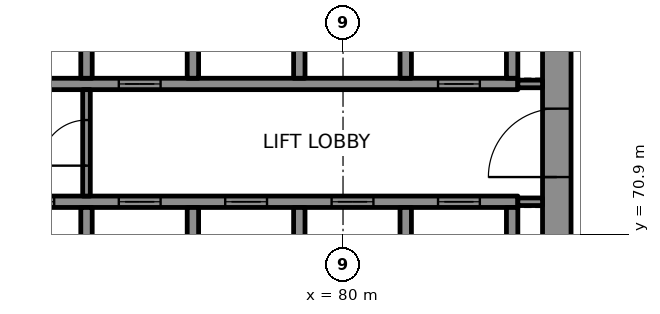
"""IFC4 building model, lengths in metres.
Left out: names, types, materials, properties, quantities, classifications, styles, units other than length and angle.
Written with IfcOpenShell. Run it as: python <this file> out.ifc"""

import sys

from ifc_helpers import new_model, si_unit, direction, frame, frame_2d, origin, place, context, subcontext, project, spatial, rectangle, extrude, element, fill, save


model = new_model("IFC4")
c1 = context("Model", 3, precision=1e-05, world=origin(), true_north=direction((0.0, 1.0)))
c2 = subcontext(c1, "Body", "Model", "MODEL_VIEW")
j1 = project(units=[si_unit("LENGTHUNIT", "METRE"), si_unit("PLANEANGLEUNIT", "RADIAN")], contexts=[c1])
p1 = place(None, origin())
s1 = spatial("IfcSite", under=j1, at=p1, CompositionType="ELEMENT")
p2 = place(p1, origin())
s2 = spatial("IfcBuilding", under=s1, at=p2, CompositionType="ELEMENT")
p3 = place(p2, frame((0.0, 0.0, 151.3)))
s3 = spatial("IfcBuildingStorey", under=s2, at=p3, CompositionType="ELEMENT", Elevation=151.3)
p4 = place(p3, frame((85.625, 67.75, 0.0), z_axis=(0.0, 0.0, 1.0), x_axis=(0.0, 1.0, 0.0)))
e1 = element("IfcWall", 1, at=p4, inside=s3, PredefinedType="SHEAR", context=c2, shape_type="SweptSolid", body=[
    extrude(rectangle(XDim=14.5, YDim=0.75, at=frame_2d((7.25, 0.0))), origin(), (0.0, 0.0, 1.0), 4.3),
])
p5 = place(p4, frame((4.65, 0.0, 0.0)))
e2 = element("IfcOpeningElement", 2, at=p5, cuts=e1, PredefinedType="OPENING", context=c2, shape_type="SweptSolid", body=[
    extrude(rectangle(XDim=1.8, YDim=2.1, at=frame_2d((0.9, 1.05))), frame((0.0, 0.385, 0.0), z_axis=(0.0, -1.0, 0.0), x_axis=(1.0, 0.0, 0.0)), (0.0, 0.0, 1.0), 0.77),
])
p6 = place(p4, frame((11.8, 0.0, 0.0)))
e3 = element("IfcOpeningElement", 3, at=p6, cuts=e1, PredefinedType="OPENING", context=c2, shape_type="SweptSolid", body=[
    extrude(rectangle(XDim=0.9, YDim=2.1, at=frame_2d((0.45, 1.05))), frame((0.0, 0.385, 0.0), z_axis=(0.0, -1.0, 0.0), x_axis=(1.0, 0.0, 0.0)), (0.0, 0.0, 1.0), 0.77),
])
p7 = place(p3, frame((70.3, 71.75, 0.0), z_axis=(0.0, 0.0, 1.0), x_axis=(1.0, 0.0, 0.0)))
e4 = element("IfcWall", 4, at=p7, inside=s3, PredefinedType="SHEAR", context=c2, shape_type="SweptSolid", body=[
    extrude(rectangle(XDim=14.3, YDim=0.3, at=frame_2d((7.15, 0.0))), origin(), (0.0, 0.0, 1.0), 4.3),
])
p8 = place(p7, frame((1.0, 0.0, 0.0)))
e5 = element("IfcOpeningElement", 5, at=p8, cuts=e4, PredefinedType="OPENING", context=c2, shape_type="SweptSolid", body=[
    extrude(rectangle(XDim=1.1, YDim=2.1, at=frame_2d((0.55, 1.05))), frame((0.0, 0.16, 0.0), z_axis=(0.0, -1.0, 0.0), x_axis=(1.0, 0.0, 0.0)), (0.0, 0.0, 1.0), 0.32),
])
p9 = place(p7, frame((3.8, 0.0, 0.0)))
e6 = element("IfcOpeningElement", 6, at=p9, cuts=e4, PredefinedType="OPENING", context=c2, shape_type="SweptSolid", body=[
    extrude(rectangle(XDim=1.1, YDim=2.1, at=frame_2d((0.55, 1.05))), frame((0.0, 0.16, 0.0), z_axis=(0.0, -1.0, 0.0), x_axis=(1.0, 0.0, 0.0)), (0.0, 0.0, 1.0), 0.32),
])
p10 = place(p7, frame((6.6, 0.0, 0.0)))
e7 = element("IfcOpeningElement", 7, at=p10, cuts=e4, PredefinedType="OPENING", context=c2, shape_type="SweptSolid", body=[
    extrude(rectangle(XDim=1.1, YDim=2.1, at=frame_2d((0.55, 1.05))), frame((0.0, 0.16, 0.0), z_axis=(0.0, -1.0, 0.0), x_axis=(1.0, 0.0, 0.0)), (0.0, 0.0, 1.0), 0.32),
])
p11 = place(p7, frame((9.4, 0.0, 0.0)))
e8 = element("IfcOpeningElement", 8, at=p11, cuts=e4, PredefinedType="OPENING", context=c2, shape_type="SweptSolid", body=[
    extrude(rectangle(XDim=1.1, YDim=2.1, at=frame_2d((0.55, 1.05))), frame((0.0, 0.16, 0.0), z_axis=(0.0, -1.0, 0.0), x_axis=(1.0, 0.0, 0.0)), (0.0, 0.0, 1.0), 0.32),
])
p12 = place(p7, frame((12.2, 0.0, 0.0)))
e9 = element("IfcOpeningElement", 9, at=p12, cuts=e4, PredefinedType="OPENING", context=c2, shape_type="SweptSolid", body=[
    extrude(rectangle(XDim=1.1, YDim=2.1, at=frame_2d((0.55, 1.05))), frame((0.0, 0.16, 0.0), z_axis=(0.0, -1.0, 0.0), x_axis=(1.0, 0.0, 0.0)), (0.0, 0.0, 1.0), 0.32),
])
p13 = place(p3, frame((70.3, 74.85, 0.0), z_axis=(0.0, 0.0, 1.0), x_axis=(1.0, 0.0, 0.0)))
e10 = element("IfcWall", 10, at=p13, inside=s3, PredefinedType="SHEAR", context=c2, shape_type="SweptSolid", body=[
    extrude(rectangle(XDim=14.3, YDim=0.3, at=frame_2d((7.15, 0.0))), origin(), (0.0, 0.0, 1.0), 4.3),
])
p14 = place(p13, frame((3.8, 0.0, 0.0)))
e11 = element("IfcOpeningElement", 11, at=p14, cuts=e10, PredefinedType="OPENING", context=c2, shape_type="SweptSolid", body=[
    extrude(rectangle(XDim=1.1, YDim=2.1, at=frame_2d((0.55, 1.05))), frame((0.0, 0.16, 0.0), z_axis=(0.0, -1.0, 0.0), x_axis=(1.0, 0.0, 0.0)), (0.0, 0.0, 1.0), 0.32),
])
p15 = place(p13, frame((12.2, 0.0, 0.0)))
e12 = element("IfcOpeningElement", 12, at=p15, cuts=e10, PredefinedType="OPENING", context=c2, shape_type="SweptSolid", body=[
    extrude(rectangle(XDim=1.1, YDim=2.1, at=frame_2d((0.55, 1.05))), frame((0.0, 0.16, 0.0), z_axis=(0.0, -1.0, 0.0), x_axis=(1.0, 0.0, 0.0)), (0.0, 0.0, 1.0), 0.32),
])
for number, where, z_axis, x_axis in (
    (13, (73.25, 69.0, 0.0), (0.0, 0.0, 1.0), (0.0, 1.0, 0.0)),
    (14, (73.25, 75.0, 0.0), (0.0, 0.0, 1.0), (0.0, 1.0, 0.0)),
    (15, (76.05, 69.0, 0.0), (0.0, 0.0, 1.0), (0.0, 1.0, 0.0)),
    (16, (76.05, 75.0, 0.0), (0.0, 0.0, 1.0), (0.0, 1.0, 0.0)),
    (17, (78.85, 69.0, 0.0), (0.0, 0.0, 1.0), (0.0, 1.0, 0.0)),
    (18, (78.85, 75.0, 0.0), (0.0, 0.0, 1.0), (0.0, 1.0, 0.0)),
    (19, (81.65, 69.0, 0.0), (0.0, 0.0, 1.0), (0.0, 1.0, 0.0)),
    (20, (81.65, 75.0, 0.0), (0.0, 0.0, 1.0), (0.0, 1.0, 0.0)),
    (21, (84.45, 69.0, 0.0), (0.0, 0.0, 1.0), (0.0, 1.0, 0.0)),
    (22, (84.45, 75.0, 0.0), (0.0, 0.0, 1.0), (0.0, 1.0, 0.0)),
):
    element("IfcWall", number, at=place(p3, frame(where, z_axis=z_axis, x_axis=x_axis)), inside=s3, PredefinedType="SHEAR", context=c2, shape_type="SweptSolid", body=[
        extrude(rectangle(XDim=2.6, YDim=0.3, at=frame_2d((1.3, 0.0))), origin(), (0.0, 0.0, 1.0), 4.3),
    ])
p16 = place(p3, frame((106.129, 61.245, 0.0), z_axis=(0.0, 0.0, 1.0), x_axis=(-0.500000750612, 0.866024970418, 0.0)))
e23 = element("IfcWall", 23, at=p16, inside=s3, PredefinedType="SOLIDWALL", context=c2, shape_type="SweptSolid", body=[
    extrude(rectangle(XDim=54.954, YDim=0.3, at=frame_2d((27.477, 0.0))), origin(), (0.0, 0.0, 1.0), 4.3),
])
p17 = place(p16, frame((2.96, 0.0, 0.8)))
e24 = element("IfcOpeningElement", 24, at=p17, cuts=e23, PredefinedType="OPENING", context=c2, shape_type="SweptSolid", body=[
    extrude(rectangle(XDim=3.0, YDim=2.4, at=frame_2d((1.5, 1.2))), frame((0.0, 0.16, 0.0), z_axis=(0.0, -1.0, 0.0), x_axis=(1.0, 0.0, 0.0)), (0.0, 0.0, 1.0), 0.32),
])
p18 = place(p16, frame((48.994, 0.0, 0.8)))
e25 = element("IfcOpeningElement", 25, at=p18, cuts=e23, PredefinedType="OPENING", context=c2, shape_type="SweptSolid", body=[
    extrude(rectangle(XDim=3.0, YDim=2.4, at=frame_2d((1.5, 1.2))), frame((0.0, 0.16, 0.0), z_axis=(0.0, -1.0, 0.0), x_axis=(1.0, 0.0, 0.0)), (0.0, 0.0, 1.0), 0.32),
])
for number, where, z_axis, x_axis in (
    (26, (84.6, 71.75, 0.0), (0.0, 0.0, 1.0), (1.0, 0.0, 0.0)),
    (27, (84.6, 74.85, 0.0), (0.0, 0.0, 1.0), (1.0, 0.0, 0.0)),
):
    element("IfcWall", number, at=place(p3, frame(where, z_axis=z_axis, x_axis=x_axis)), inside=s3, PredefinedType="PARTITIONING", context=c2, shape_type="SweptSolid", body=[
        extrude(rectangle(XDim=0.65, YDim=0.2, at=frame_2d((0.325, 0.0))), origin(), (0.0, 0.0, 1.0), 4.3),
    ])
p19 = place(p3, frame((73.25, 71.9, 0.0), z_axis=(0.0, 0.0, 1.0), x_axis=(0.0, 1.0, 0.0)))
e28 = element("IfcWall", 28, at=p19, inside=s3, PredefinedType="PARTITIONING", context=c2, shape_type="SweptSolid", body=[
    extrude(rectangle(XDim=2.8, YDim=0.2, at=frame_2d((1.4, 0.0))), origin(), (0.0, 0.0, 1.0), 4.3),
])
p20 = place(p19, frame((0.8, 0.0, 0.0)))
e29 = element("IfcOpeningElement", 29, at=p20, cuts=e28, PredefinedType="OPENING", context=c2, shape_type="SweptSolid", body=[
    extrude(rectangle(XDim=1.2, YDim=2.1, at=frame_2d((0.6, 1.05))), frame((0.0, 0.11, 0.0), z_axis=(0.0, -1.0, 0.0), x_axis=(1.0, 0.0, 0.0)), (0.0, 0.0, 1.0), 0.22),
])
p21 = place(p8, origin())
e30 = element("IfcDoor", 30, at=p21, inside=s3, OperationType="DOUBLE_DOOR_SLIDING", PredefinedType="DOOR", context=c2, shape_type="SweptSolid", body=[
    extrude(rectangle(XDim=1.1, YDim=2.1, at=frame_2d((0.55, 1.05))), frame((0.0, 0.025, 0.0), z_axis=(0.0, -1.0, 0.0), x_axis=(1.0, 0.0, 0.0)), (0.0, 0.0, 1.0), 0.05),
])
fill(e5, e30)
p22 = place(p9, origin())
e31 = element("IfcDoor", 31, at=p22, inside=s3, OperationType="DOUBLE_DOOR_SLIDING", PredefinedType="DOOR", context=c2, shape_type="SweptSolid", body=[
    extrude(rectangle(XDim=1.1, YDim=2.1, at=frame_2d((0.55, 1.05))), frame((0.0, 0.025, 0.0), z_axis=(0.0, -1.0, 0.0), x_axis=(1.0, 0.0, 0.0)), (0.0, 0.0, 1.0), 0.05),
])
fill(e6, e31)
p23 = place(p10, origin())
e32 = element("IfcDoor", 32, at=p23, inside=s3, OperationType="DOUBLE_DOOR_SLIDING", PredefinedType="DOOR", context=c2, shape_type="SweptSolid", body=[
    extrude(rectangle(XDim=1.1, YDim=2.1, at=frame_2d((0.55, 1.05))), frame((0.0, 0.025, 0.0), z_axis=(0.0, -1.0, 0.0), x_axis=(1.0, 0.0, 0.0)), (0.0, 0.0, 1.0), 0.05),
])
fill(e7, e32)
p24 = place(p11, origin())
e33 = element("IfcDoor", 33, at=p24, inside=s3, OperationType="DOUBLE_DOOR_SLIDING", PredefinedType="DOOR", context=c2, shape_type="SweptSolid", body=[
    extrude(rectangle(XDim=1.1, YDim=2.1, at=frame_2d((0.55, 1.05))), frame((0.0, 0.025, 0.0), z_axis=(0.0, -1.0, 0.0), x_axis=(1.0, 0.0, 0.0)), (0.0, 0.0, 1.0), 0.05),
])
fill(e8, e33)
p25 = place(p12, origin())
e34 = element("IfcDoor", 34, at=p25, inside=s3, OperationType="DOUBLE_DOOR_SLIDING", PredefinedType="DOOR", context=c2, shape_type="SweptSolid", body=[
    extrude(rectangle(XDim=1.1, YDim=2.1, at=frame_2d((0.55, 1.05))), frame((0.0, 0.025, 0.0), z_axis=(0.0, -1.0, 0.0), x_axis=(1.0, 0.0, 0.0)), (0.0, 0.0, 1.0), 0.05),
])
fill(e9, e34)
p26 = place(p14, origin())
e35 = element("IfcDoor", 35, at=p26, inside=s3, OperationType="DOUBLE_DOOR_SLIDING", PredefinedType="DOOR", context=c2, shape_type="SweptSolid", body=[
    extrude(rectangle(XDim=1.1, YDim=2.1, at=frame_2d((0.55, 1.05))), frame((0.0, 0.025, 0.0), z_axis=(0.0, -1.0, 0.0), x_axis=(1.0, 0.0, 0.0)), (0.0, 0.0, 1.0), 0.05),
])
fill(e11, e35)
p27 = place(p15, origin())
e36 = element("IfcDoor", 36, at=p27, inside=s3, OperationType="DOUBLE_DOOR_SLIDING", PredefinedType="DOOR", context=c2, shape_type="SweptSolid", body=[
    extrude(rectangle(XDim=1.1, YDim=2.1, at=frame_2d((0.55, 1.05))), frame((0.0, 0.025, 0.0), z_axis=(0.0, -1.0, 0.0), x_axis=(1.0, 0.0, 0.0)), (0.0, 0.0, 1.0), 0.05),
])
fill(e12, e36)
p28 = place(p20, origin())
e37 = element("IfcDoor", 37, at=p28, inside=s3, OperationType="SINGLE_SWING_LEFT", PredefinedType="DOOR", context=c2, shape_type="SweptSolid", body=[
    extrude(rectangle(XDim=1.2, YDim=2.1, at=frame_2d((0.6, 1.05))), frame((0.0, 0.025, 0.0), z_axis=(0.0, -1.0, 0.0), x_axis=(1.0, 0.0, 0.0)), (0.0, 0.0, 1.0), 0.05),
])
fill(e29, e37)
p29 = place(p5, origin())
e38 = element("IfcDoor", 38, at=p29, inside=s3, OperationType="SINGLE_SWING_RIGHT", PredefinedType="DOOR", context=c2, shape_type="SweptSolid", body=[
    extrude(rectangle(XDim=1.8, YDim=2.1, at=frame_2d((0.9, 1.05))), frame((0.0, 0.095, 0.0), z_axis=(0.0, -1.0, 0.0), x_axis=(1.0, 0.0, 0.0)), (0.0, 0.0, 1.0), 0.19),
])
fill(e2, e38)
save(model, sys.argv[1])
